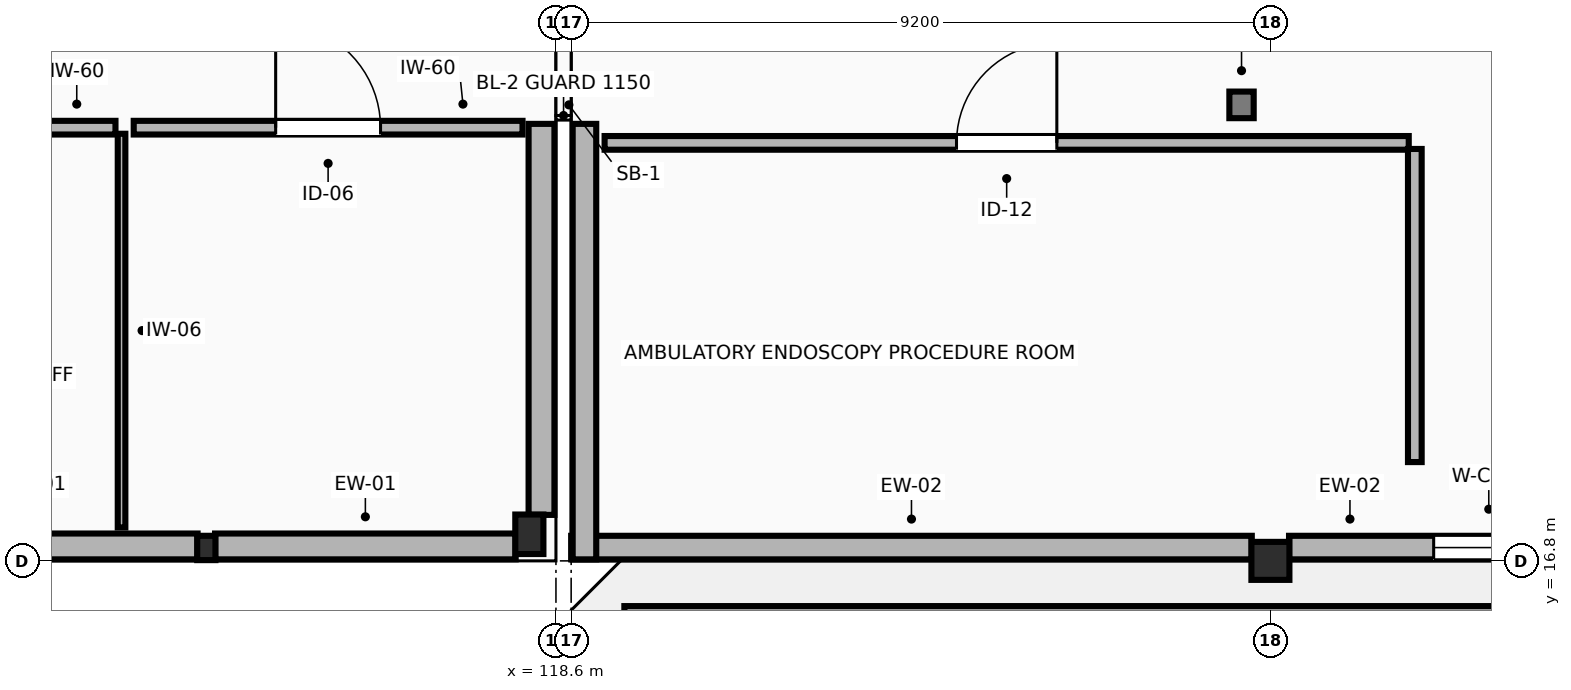
"""IFC4 building model, lengths in metres.
Left out: names, types, materials, properties, quantities, classifications, styles, units other than length and angle.
Written with IfcOpenShell. Run it as: python <this file> out.ifc"""

import sys

from ifc_helpers import new_model, si_unit, direction, frame, frame_2d, origin, origin_2d, place, context, subcontext, project, spatial, rectangle, extrude, element, fill, save


model = new_model("IFC4")
c1 = context("Model", 3, precision=1e-05, world=origin(), true_north=direction((0.0, 1.0)))
c2 = subcontext(c1, "Body", "Model", "MODEL_VIEW")
j1 = project(units=[si_unit("LENGTHUNIT", "METRE"), si_unit("PLANEANGLEUNIT", "RADIAN")], contexts=[c1])
p1 = place(None, origin())
s1 = spatial("IfcSite", under=j1, at=p1, CompositionType="ELEMENT")
p2 = place(p1, origin())
s2 = spatial("IfcBuilding", under=s1, at=p2, CompositionType="ELEMENT")
p3 = place(p2, frame((0.0, 0.0, 5.4)))
s3 = spatial("IfcBuildingStorey", under=s2, at=p3, CompositionType="ELEMENT", Elevation=5.4)
p4 = place(p3, frame((118.25, 17.15, 0.0), z_axis=(0.0, 0.0, 1.0), x_axis=(1.0, 0.0, 0.0)))
e1 = element("IfcColumn", 1, at=p4, inside=s3, PredefinedType="COLUMN", context=c2, shape_type="SweptSolid", body=[
    extrude(rectangle(XDim=0.37, YDim=0.52, at=origin_2d()), origin(), (0.0, 0.0, 1.0), 4.2),
])
p5 = place(p3, frame((128.0, 16.8, 0.0), z_axis=(0.0, 0.0, 1.0), x_axis=(1.0, 0.0, 0.0)))
e2 = element("IfcColumn", 2, at=p5, inside=s3, PredefinedType="COLUMN", context=c2, shape_type="SweptSolid", body=[
    extrude(rectangle(XDim=0.5, YDim=0.5, at=origin_2d()), origin(), (0.0, 0.0, 1.0), 4.2),
])
p6 = place(p3, frame((114.0, 16.97, 0.0), z_axis=(0.0, 0.0, 1.0), x_axis=(1.0, 0.0, 0.0)))
e3 = element("IfcColumn", 3, at=p6, inside=s3, PredefinedType="PILASTER", context=c2, shape_type="SweptSolid", body=[
    extrude(rectangle(XDim=0.24, YDim=0.32, at=origin_2d()), origin(), (0.0, 0.0, 1.0), 4.2),
])
p7 = place(p3, frame((127.46, 22.8, 0.0), z_axis=(0.0, 0.0, 1.0), x_axis=(1.0, 0.0, 0.0)))
e4 = element("IfcWall", 4, at=p7, inside=s3, PredefinedType="SHEAR", context=c2, shape_type="SweptSolid", body=[
    extrude(rectangle(XDim=0.32, YDim=0.35, at=frame_2d((0.16, 0.0))), origin(), (0.0, 0.0, 1.0), 4.2),
])
p8 = place(p3, frame((109.605, 16.99, 0.0), z_axis=(0.0, 0.0, 1.0), x_axis=(1.0, 0.0, 0.0)))
e5 = element("IfcWall", 5, at=p8, inside=s3, PredefinedType="STANDARD", context=c2, shape_type="SweptSolid", body=[
    extrude(rectangle(XDim=4.28, YDim=0.34, at=frame_2d((2.14, 0.0))), origin(), (0.0, 0.0, 1.0), 3.215),
])
p9 = place(p3, frame((114.115, 16.99, 0.0), z_axis=(0.0, 0.0, 1.0), x_axis=(1.0, 0.0, 0.0)))
e6 = element("IfcWall", 6, at=p9, inside=s3, PredefinedType="STANDARD", context=c2, shape_type="SweptSolid", body=[
    extrude(rectangle(XDim=3.955, YDim=0.34, at=frame_2d((1.978, 0.0))), origin(), (0.0, 0.0, 1.0), 3.215),
])
p10 = place(p3, frame((118.41, 17.405, 0.0), z_axis=(0.0, 0.0, 1.0), x_axis=(0.0, 1.0, 0.0)))
e7 = element("IfcWall", 7, at=p10, inside=s3, PredefinedType="STANDARD", context=c2, shape_type="SweptSolid", body=[
    extrude(rectangle(XDim=5.145, YDim=0.34, at=frame_2d((2.573, 0.0))), origin(), (0.0, 0.0, 1.0), 3.365),
])
p11 = place(p3, frame((118.8, 16.975, 0.0), z_axis=(0.0, 0.0, 1.0), x_axis=(1.0, 0.0, 0.0)))
e8 = element("IfcWall", 8, at=p11, inside=s3, PredefinedType="STANDARD", context=c2, shape_type="SweptSolid", body=[
    extrude(rectangle(XDim=8.955, YDim=0.31, at=frame_2d((4.478, 0.0))), origin(), (0.0, 0.0, 1.0), 3.9),
])
p12 = place(p3, frame((128.245, 16.975, 0.0), z_axis=(0.0, 0.0, 1.0), x_axis=(1.0, 0.0, 0.0)))
e9 = element("IfcWall", 9, at=p12, inside=s3, PredefinedType="STANDARD", context=c2, shape_type="SweptSolid", body=[
    extrude(rectangle(XDim=8.76, YDim=0.31, at=frame_2d((4.38, 0.0))), origin(), (0.0, 0.0, 1.0), 3.235),
])
p13 = place(p12, frame((1.903, 0.0, 0.95)))
e10 = element("IfcOpeningElement", 10, at=p13, cuts=e9, PredefinedType="OPENING", context=c2, shape_type="SweptSolid", body=[
    extrude(rectangle(XDim=1.45, YDim=1.7, at=frame_2d((0.725, 0.85))), frame((0.0, 0.165, 0.0), z_axis=(0.0, -1.0, 0.0), x_axis=(1.0, 0.0, 0.0)), (0.0, 0.0, 1.0), 0.33),
])
p14 = place(p12, frame((5.407, 0.0, 0.95)))
e11 = element("IfcOpeningElement", 11, at=p14, cuts=e9, PredefinedType="OPENING", context=c2, shape_type="SweptSolid", body=[
    extrude(rectangle(XDim=1.45, YDim=1.7, at=frame_2d((0.725, 0.85))), frame((0.0, 0.165, 0.0), z_axis=(0.0, -1.0, 0.0), x_axis=(1.0, 0.0, 0.0)), (0.0, 0.0, 1.0), 0.33),
])
p15 = place(p3, frame((118.975, 22.55, 0.0), z_axis=(0.0, 0.0, 1.0), x_axis=(0.0, -1.0, 0.0)))
e12 = element("IfcWall", 12, at=p15, inside=s3, PredefinedType="STANDARD", context=c2, shape_type="SweptSolid", body=[
    extrude(rectangle(XDim=5.73, YDim=0.31, at=frame_2d((2.865, 0.0))), origin(), (0.0, 0.0, 1.0), 3.9),
])
p16 = place(p3, frame((164.35, 16.1, 0.0), z_axis=(0.0, 0.0, 1.0), x_axis=(-1.0, 0.0, 0.0)))
e13 = element("IfcWall", 13, at=p16, inside=s3, PredefinedType="PARAPET", context=c2, shape_type="SweptSolid", body=[
    extrude(rectangle(XDim=44.85, YDim=0.21, at=frame_2d((22.425, 0.0))), origin(), (0.0, 0.0, 1.0), 1.05),
])
p17 = place(p3, frame((112.885, 22.42, 0.0), z_axis=(0.0, 0.0, 1.0), x_axis=(0.0, -1.0, 0.0)))
e14 = element("IfcWall", 14, at=p17, inside=s3, PredefinedType="PARTITIONING", context=c2, shape_type="SweptSolid", body=[
    extrude(rectangle(XDim=5.18, YDim=0.1, at=frame_2d((2.59, 0.0))), origin(), (0.0, 0.0, 1.0), 3.92),
])
p18 = place(p3, frame((109.087, 22.5, 0.0), z_axis=(0.0, 0.0, 1.0), x_axis=(1.0, 0.0, 0.0)))
e15 = element("IfcWall", 15, at=p18, inside=s3, PredefinedType="PARTITIONING", context=c2, shape_type="SweptSolid", body=[
    extrude(rectangle(XDim=3.718, YDim=0.18, at=frame_2d((1.859, 0.0))), origin(), (0.0, 0.0, 1.0), 3.92),
])
p19 = place(p18, frame((1.319, 0.0, 0.0)))
e16 = element("IfcOpeningElement", 16, at=p19, cuts=e15, PredefinedType="OPENING", context=c2, shape_type="SweptSolid", body=[
    extrude(rectangle(XDim=1.08, YDim=2.2, at=frame_2d((0.54, 1.1))), frame((0.0, 0.1, 0.0), z_axis=(0.0, -1.0, 0.0), x_axis=(1.0, 0.0, 0.0)), (0.0, 0.0, 1.0), 0.2),
])
p20 = place(p3, frame((113.045, 22.5, 0.0), z_axis=(0.0, 0.0, 1.0), x_axis=(1.0, 0.0, 0.0)))
e17 = element("IfcWall", 17, at=p20, inside=s3, PredefinedType="PARTITIONING", context=c2, shape_type="SweptSolid", body=[
    extrude(rectangle(XDim=5.115, YDim=0.18, at=frame_2d((2.558, 0.0))), origin(), (0.0, 0.0, 1.0), 3.92),
])
p21 = place(p20, frame((1.868, 0.0, 0.0)))
e18 = element("IfcOpeningElement", 18, at=p21, cuts=e17, PredefinedType="OPENING", context=c2, shape_type="SweptSolid", body=[
    extrude(rectangle(XDim=1.38, YDim=2.25, at=frame_2d((0.69, 1.125))), frame((0.0, 0.1, 0.0), z_axis=(0.0, -1.0, 0.0), x_axis=(1.0, 0.0, 0.0)), (0.0, 0.0, 1.0), 0.2),
])
p22 = place(p3, frame((119.24, 22.3, 0.0), z_axis=(0.0, 0.0, 1.0), x_axis=(1.0, 0.0, 0.0)))
e19 = element("IfcWall", 19, at=p22, inside=s3, PredefinedType="PARTITIONING", context=c2, shape_type="SweptSolid", body=[
    extrude(rectangle(XDim=10.58, YDim=0.18, at=frame_2d((5.29, 0.0))), origin(), (0.0, 0.0, 1.0), 3.9),
])
p23 = place(p22, frame((4.63, 0.0, 0.0)))
e20 = element("IfcOpeningElement", 20, at=p23, cuts=e19, PredefinedType="OPENING", context=c2, shape_type="SweptSolid", body=[
    extrude(rectangle(XDim=1.32, YDim=2.22, at=frame_2d((0.66, 1.11))), frame((0.0, 0.1, 0.0), z_axis=(0.0, -1.0, 0.0), x_axis=(1.0, 0.0, 0.0)), (0.0, 0.0, 1.0), 0.2),
])
p24 = place(p3, frame((129.9, 22.22, 0.0), z_axis=(0.0, 0.0, 1.0), x_axis=(0.0, -1.0, 0.0)))
e21 = element("IfcWall", 21, at=p24, inside=s3, PredefinedType="PARTITIONING", context=c2, shape_type="SweptSolid", body=[
    extrude(rectangle(XDim=4.12, YDim=0.18, at=frame_2d((2.06, 0.0))), origin(), (0.0, 0.0, 1.0), 3.9),
])
p25 = place(p13, origin())
e22 = element("IfcWindow", 22, at=p25, inside=s3, PartitioningType="SINGLE_PANEL", PredefinedType="WINDOW", context=c2, shape_type="SweptSolid", body=[
    extrude(rectangle(XDim=1.45, YDim=1.7, at=frame_2d((0.725, 0.85))), frame((0.0, 0.03, 0.0), z_axis=(0.0, -1.0, 0.0), x_axis=(1.0, 0.0, 0.0)), (0.0, 0.0, 1.0), 0.06),
])
fill(e10, e22)
p26 = place(p21, origin())
e23 = element("IfcDoor", 23, at=p26, inside=s3, OperationType="SINGLE_SWING_LEFT", PredefinedType="DOOR", context=c2, shape_type="SweptSolid", body=[
    extrude(rectangle(XDim=1.38, YDim=2.25, at=frame_2d((0.69, 1.125))), frame((0.0, 0.025, 0.0), z_axis=(0.0, -1.0, 0.0), x_axis=(1.0, 0.0, 0.0)), (0.0, 0.0, 1.0), 0.05),
])
fill(e18, e23)
p27 = place(p23, origin())
e24 = element("IfcDoor", 24, at=p27, inside=s3, OperationType="SINGLE_SWING_RIGHT", PredefinedType="DOOR", context=c2, shape_type="SweptSolid", body=[
    extrude(rectangle(XDim=1.32, YDim=2.22, at=frame_2d((0.66, 1.11))), frame((0.0, 0.025, 0.0), z_axis=(0.0, -1.0, 0.0), x_axis=(1.0, 0.0, 0.0)), (0.0, 0.0, 1.0), 0.05),
])
fill(e20, e24)
save(model, sys.argv[1])
